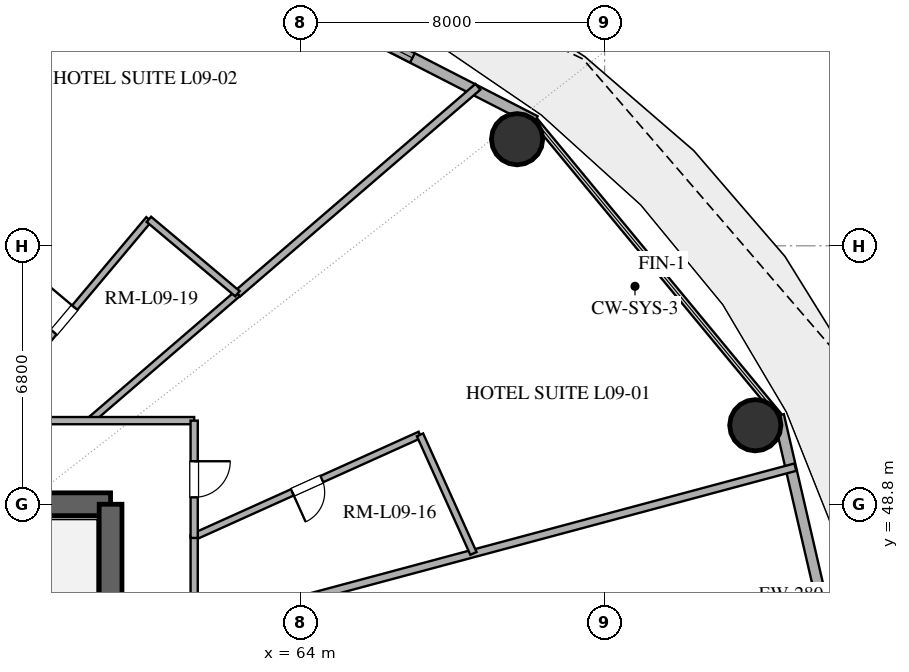
"""IFC4 building model, lengths in metres.
Left out: names, types, materials, properties, quantities, classifications, styles, units other than length and angle.
Written with IfcOpenShell. Run it as: python <this file> out.ifc"""

import sys

from ifc_helpers import new_model, si_unit, direction, frame, frame_2d, origin, origin_2d, place, context, subcontext, project, spatial, rectangle, hollow_circle, extrude, element, fill, save


model = new_model("IFC4")
c1 = context("Model", 3, precision=1e-05, world=origin(), true_north=direction((0.0, 1.0)))
c2 = subcontext(c1, "Body", "Model", "MODEL_VIEW")
j1 = project(units=[si_unit("LENGTHUNIT", "METRE"), si_unit("PLANEANGLEUNIT", "RADIAN")], contexts=[c1])
p1 = place(None, origin())
s1 = spatial("IfcSite", under=j1, at=p1, CompositionType="ELEMENT")
p2 = place(p1, origin())
s2 = spatial("IfcBuilding", under=s1, at=p2, CompositionType="ELEMENT")
p3 = place(p2, frame((0.0, 0.0, 42.6)))
s3 = spatial("IfcBuildingStorey", under=s2, at=p3, CompositionType="ELEMENT", Elevation=42.6)
p4 = place(p3, frame((55.0, 48.8, 0.0), z_axis=(0.0, 0.0, 1.0), x_axis=(1.0, 0.0, 0.0)))
e1 = element("IfcWall", 1, at=p4, inside=s3, PredefinedType="SHEAR", context=c2, shape_type="SweptSolid", body=[
    extrude(rectangle(XDim=4.0, YDim=0.6, at=frame_2d((2.0, 0.0))), origin(), (0.0, 0.0, 1.0), 3.38),
])
p5 = place(p3, frame((59.0, 35.2, 0.0), z_axis=(0.0, 0.0, 1.0), x_axis=(0.0, 1.0, 0.0)))
e2 = element("IfcWall", 2, at=p5, inside=s3, PredefinedType="SHEAR", context=c2, shape_type="SweptSolid", body=[
    extrude(rectangle(XDim=13.6, YDim=0.6, at=frame_2d((6.8, 0.0))), origin(), (0.0, 0.0, 1.0), 3.38),
])
p6 = place(p5, frame((1.5, 0.0, 0.0)))
e3 = element("IfcOpeningElement", 3, at=p6, cuts=e2, PredefinedType="OPENING", context=c2, shape_type="SweptSolid", body=[
    extrude(rectangle(XDim=1.2, YDim=2.15, at=frame_2d((0.6, 1.075))), frame((0.0, 0.31, 0.0), z_axis=(0.0, -1.0, 0.0), x_axis=(1.0, 0.0, 0.0)), (0.0, 0.0, 1.0), 0.62),
])
for number, where, z_axis, x_axis in (
    (4, (75.966, 50.878, 0.0), (0.0, 0.0, 1.0), (1.0, 0.0, 0.0)),
    (5, (69.697, 58.405, 0.0), (0.0, 0.0, 1.0), (1.0, 0.0, 0.0)),
):
    element("IfcColumn", number, at=place(p3, frame(where, z_axis=z_axis, x_axis=x_axis)), inside=s3, PredefinedType="COLUMN", context=c2, shape_type="SweptSolid", body=[
        extrude(hollow_circle(Radius=0.675, WallThickness=0.036, at=origin_2d()), origin(), (0.0, 0.0, 1.0), 3.38),
    ])
p7 = place(p3, frame((78.696, 42.0, 0.0), z_axis=(0.0, 0.0, 1.0), x_axis=(-0.225454452941, 0.974253709076, 0.0)))
e6 = element("IfcWall", 6, at=p7, inside=s3, PredefinedType="SOLIDWALL", context=c2, shape_type="SweptSolid", body=[
    extrude(rectangle(XDim=9.38, YDim=0.28, at=frame_2d((4.69, 0.0))), origin(), (0.0, 0.0, 1.0), 3.38),
])
p8 = place(p7, frame((1.579, 0.0, 0.0)))
e7 = element("IfcOpeningElement", 7, at=p8, cuts=e6, PredefinedType="OPENING", context=c2, shape_type="SweptSolid", body=[
    extrude(rectangle(XDim=1.4, YDim=2.2, at=frame_2d((0.7, 1.1))), frame((0.0, 0.15, 0.0), z_axis=(0.0, -1.0, 0.0), x_axis=(1.0, 0.0, 0.0)), (0.0, 0.0, 1.0), 0.3),
])
p9 = place(p3, frame((70.174, 58.886, 0.0), z_axis=(0.0, 0.0, 1.0), x_axis=(-0.889853976658, 0.456245438581, 0.0)))
e8 = element("IfcWall", 8, at=p9, inside=s3, PredefinedType="SOLIDWALL", context=c2, shape_type="SweptSolid", body=[
    extrude(rectangle(XDim=11.346, YDim=0.28, at=frame_2d((5.673, 0.0))), origin(), (0.0, 0.0, 1.0), 3.38),
])
p10 = place(p9, frame((3.632, 0.0, 0.85)))
e9 = element("IfcOpeningElement", 9, at=p10, cuts=e8, PredefinedType="OPENING", context=c2, shape_type="SweptSolid", body=[
    extrude(rectangle(XDim=1.5, YDim=1.8, at=frame_2d((0.75, 0.9))), frame((0.0, 0.15, 0.0), z_axis=(0.0, -1.0, 0.0), x_axis=(1.0, 0.0, 0.0)), (0.0, 0.0, 1.0), 0.3),
])
p11 = place(p9, frame((6.761, 0.0, 0.85)))
e10 = element("IfcOpeningElement", 10, at=p11, cuts=e8, PredefinedType="OPENING", context=c2, shape_type="SweptSolid", body=[
    extrude(rectangle(XDim=1.5, YDim=1.8, at=frame_2d((0.75, 0.9))), frame((0.0, 0.15, 0.0), z_axis=(0.0, -1.0, 0.0), x_axis=(1.0, 0.0, 0.0)), (0.0, 0.0, 1.0), 0.3),
])
p12 = place(p3, frame((57.825, 64.519, 0.0), z_axis=(0.0, 0.0, 1.0), x_axis=(-0.399884283786, -0.916565632991, 0.0)))
e11 = element("IfcWall", 11, at=p12, inside=s3, PredefinedType="PARTITIONING", context=c2, shape_type="SweptSolid", body=[
    extrude(rectangle(XDim=14.749, YDim=0.2, at=frame_2d((7.375, 0.0))), origin(), (0.0, 0.0, 1.0), 2.74),
])
p13 = place(p3, frame((61.2, 45.537, 0.0), z_axis=(0.0, 0.0, 1.0), x_axis=(0.965922233104, 0.258832454679, 0.0)))
e12 = element("IfcWall", 12, at=p13, inside=s3, PredefinedType="PARTITIONING", context=c2, shape_type="SweptSolid", body=[
    extrude(rectangle(XDim=16.377, YDim=0.2, at=frame_2d((8.189, 0.0))), origin(), (0.0, 0.0, 1.0), 2.74),
])
p14 = place(p3, frame((68.666, 59.784, 0.0), z_axis=(0.0, 0.0, 1.0), x_axis=(-0.757966817992, -0.652293111127, 0.0)))
e13 = element("IfcWall", 13, at=p14, inside=s3, PredefinedType="PARTITIONING", context=c2, shape_type="SweptSolid", body=[
    extrude(rectangle(XDim=8.347, YDim=0.2, at=frame_2d((4.174, 0.0))), origin(), (0.0, 0.0, 1.0), 2.74),
])
p15 = place(p3, frame((55.56, 51.0, 0.0), z_axis=(0.0, 0.0, 1.0), x_axis=(0.643154836645, 0.765736153058, 0.0)))
e14 = element("IfcWall", 14, at=p15, inside=s3, PredefinedType="PLUMBINGWALL", context=c2, shape_type="SweptSolid", body=[
    extrude(rectangle(XDim=6.917, YDim=0.18, at=frame_2d((3.458, 0.0))), origin(), (0.0, 0.0, 1.0), 2.74),
])
p16 = place(p15, frame((3.034, 0.0, 0.0)))
e15 = element("IfcOpeningElement", 15, at=p16, cuts=e14, PredefinedType="OPENING", context=c2, shape_type="SweptSolid", body=[
    extrude(rectangle(XDim=0.85, YDim=2.1, at=frame_2d((0.425, 1.05))), frame((0.0, 0.1, 0.0), z_axis=(0.0, -1.0, 0.0), x_axis=(1.0, 0.0, 0.0)), (0.0, 0.0, 1.0), 0.2),
])
p17 = place(p3, frame((67.143, 50.626, 0.0), z_axis=(0.0, 0.0, 1.0), x_axis=(-0.911702033518, -0.410852044025, 0.0)))
e16 = element("IfcWall", 16, at=p17, inside=s3, PredefinedType="PLUMBINGWALL", context=c2, shape_type="SweptSolid", body=[
    extrude(rectangle(XDim=6.519, YDim=0.18, at=frame_2d((3.259, 0.0))), origin(), (0.0, 0.0, 1.0), 2.74),
])
p18 = place(p17, frame((2.834, 0.0, 0.0)))
e17 = element("IfcOpeningElement", 17, at=p18, cuts=e16, PredefinedType="OPENING", context=c2, shape_type="SweptSolid", body=[
    extrude(rectangle(XDim=0.85, YDim=2.1, at=frame_2d((0.425, 1.05))), frame((0.0, 0.1, 0.0), z_axis=(0.0, -1.0, 0.0), x_axis=(1.0, 0.0, 0.0)), (0.0, 0.0, 1.0), 0.2),
])
p19 = place(p3, frame((62.339, 54.339, 0.0), z_axis=(0.0, 0.0, 1.0), x_axis=(-0.757969199921, -0.652290343307, 0.0)))
e18 = element("IfcWall", 18, at=p19, inside=s3, PredefinedType="PLUMBINGWALL", context=c2, shape_type="SweptSolid", body=[
    extrude(rectangle(XDim=5.119, YDim=0.18, at=frame_2d((2.56, 0.0))), origin(), (0.0, 0.0, 1.0), 2.74),
])
p20 = place(p3, frame((46.153, 51.0, 0.0), z_axis=(0.0, 0.0, 1.0), x_axis=(1.0, 0.0, 0.0)))
e19 = element("IfcWall", 19, at=p20, inside=s3, PredefinedType="PARTITIONING", context=c2, shape_type="SweptSolid", body=[
    extrude(rectangle(XDim=15.047, YDim=0.19, at=frame_2d((7.524, 0.0))), origin(), (0.0, 0.0, 1.0), 2.74),
])
p21 = place(p20, frame((3.144, 0.0, 0.0)))
e20 = element("IfcOpeningElement", 20, at=p21, cuts=e19, PredefinedType="OPENING", context=c2, shape_type="SweptSolid", body=[
    extrude(rectangle(XDim=1.0, YDim=2.2, at=frame_2d((0.5, 1.1))), frame((0.0, 0.105, 0.0), z_axis=(0.0, -1.0, 0.0), x_axis=(1.0, 0.0, 0.0)), (0.0, 0.0, 1.0), 0.21),
])
p22 = place(p20, frame((7.119, 0.0, 0.0)))
e21 = element("IfcOpeningElement", 21, at=p22, cuts=e19, PredefinedType="OPENING", context=c2, shape_type="SweptSolid", body=[
    extrude(rectangle(XDim=0.95, YDim=2.15, at=frame_2d((0.475, 1.075))), frame((0.0, 0.105, 0.0), z_axis=(0.0, -1.0, 0.0), x_axis=(1.0, 0.0, 0.0)), (0.0, 0.0, 1.0), 0.21),
])
p23 = place(p3, frame((61.2, 47.983, 0.0), z_axis=(0.0, 0.0, 1.0), x_axis=(0.0, -1.0, 0.0)))
e22 = element("IfcWall", 22, at=p23, inside=s3, PredefinedType="PARTITIONING", context=c2, shape_type="SweptSolid", body=[
    extrude(rectangle(XDim=6.351, YDim=0.19, at=frame_2d((3.176, 0.0))), origin(), (0.0, 0.0, 1.0), 2.74),
])
p24 = place(p23, frame((3.907, 0.0, 0.0)))
e23 = element("IfcOpeningElement", 23, at=p24, cuts=e22, PredefinedType="OPENING", context=c2, shape_type="SweptSolid", body=[
    extrude(rectangle(XDim=0.95, YDim=2.15, at=frame_2d((0.475, 1.075))), frame((0.0, 0.105, 0.0), z_axis=(0.0, -1.0, 0.0), x_axis=(1.0, 0.0, 0.0)), (0.0, 0.0, 1.0), 0.21),
])
p25 = place(p3, frame((68.549, 47.506, 0.0), z_axis=(0.0, 0.0, 1.0), x_axis=(-0.410839223928, 0.911707810695, 0.0)))
e24 = element("IfcWall", 24, at=p25, inside=s3, PredefinedType="PLUMBINGWALL", context=c2, shape_type="SweptSolid", body=[
    extrude(rectangle(XDim=3.422, YDim=0.18, at=frame_2d((1.711, 0.0))), origin(), (0.0, 0.0, 1.0), 2.74),
])
p26 = place(p3, frame((61.2, 51.0, 0.0), z_axis=(0.0, 0.0, 1.0), x_axis=(0.0, -1.0, 0.0)))
e25 = element("IfcWall", 25, at=p26, inside=s3, PredefinedType="PARTITIONING", context=c2, shape_type="SweptSolid", body=[
    extrude(rectangle(XDim=3.087, YDim=0.19, at=frame_2d((1.543, 0.0))), origin(), (0.0, 0.0, 1.0), 2.74),
])
p27 = place(p26, frame((1.069, 0.0, 0.0)))
e26 = element("IfcOpeningElement", 26, at=p27, cuts=e25, PredefinedType="OPENING", context=c2, shape_type="SweptSolid", body=[
    extrude(rectangle(XDim=0.95, YDim=2.15, at=frame_2d((0.475, 1.075))), frame((0.0, 0.105, 0.0), z_axis=(0.0, -1.0, 0.0), x_axis=(1.0, 0.0, 0.0)), (0.0, 0.0, 1.0), 0.21),
])
p28 = place(p3, frame((60.008, 56.297, 0.0), z_axis=(0.0, 0.0, 1.0), x_axis=(0.765736471754, -0.643154457208, 0.0)))
e27 = element("IfcWall", 27, at=p28, inside=s3, PredefinedType="PLUMBINGWALL", context=c2, shape_type="SweptSolid", body=[
    extrude(rectangle(XDim=3.043, YDim=0.18, at=frame_2d((1.521, 0.0))), origin(), (0.0, 0.0, 1.0), 2.74),
])
p29 = place(p10, origin())
e28 = element("IfcWindow", 28, at=p29, inside=s3, PartitioningType="SINGLE_PANEL", PredefinedType="WINDOW", context=c2, shape_type="SweptSolid", body=[
    extrude(rectangle(XDim=1.5, YDim=1.8, at=frame_2d((0.75, 0.9))), frame((0.0, 0.03, 0.0), z_axis=(0.0, -1.0, 0.0), x_axis=(1.0, 0.0, 0.0)), (0.0, 0.0, 1.0), 0.06),
])
fill(e9, e28)
p30 = place(p16, origin())
e29 = element("IfcDoor", 29, at=p30, inside=s3, OperationType="SINGLE_SWING_RIGHT", PredefinedType="DOOR", context=c2, shape_type="SweptSolid", body=[
    extrude(rectangle(XDim=0.85, YDim=2.1, at=frame_2d((0.425, 1.05))), frame((0.0, 0.025, 0.0), z_axis=(0.0, -1.0, 0.0), x_axis=(1.0, 0.0, 0.0)), (0.0, 0.0, 1.0), 0.05),
])
fill(e15, e29)
p31 = place(p18, origin())
e30 = element("IfcDoor", 30, at=p31, inside=s3, OperationType="SINGLE_SWING_RIGHT", PredefinedType="DOOR", context=c2, shape_type="SweptSolid", body=[
    extrude(rectangle(XDim=0.85, YDim=2.1, at=frame_2d((0.425, 1.05))), frame((0.0, 0.025, 0.0), z_axis=(0.0, -1.0, 0.0), x_axis=(1.0, 0.0, 0.0)), (0.0, 0.0, 1.0), 0.05),
])
fill(e17, e30)
p32 = place(p27, origin())
e31 = element("IfcDoor", 31, at=p32, inside=s3, OperationType="SINGLE_SWING_LEFT", PredefinedType="DOOR", context=c2, shape_type="SweptSolid", body=[
    extrude(rectangle(XDim=0.95, YDim=2.15, at=frame_2d((0.475, 1.075))), frame((0.0, 0.025, 0.0), z_axis=(0.0, -1.0, 0.0), x_axis=(1.0, 0.0, 0.0)), (0.0, 0.0, 1.0), 0.05),
])
fill(e26, e31)
save(model, sys.argv[1])
